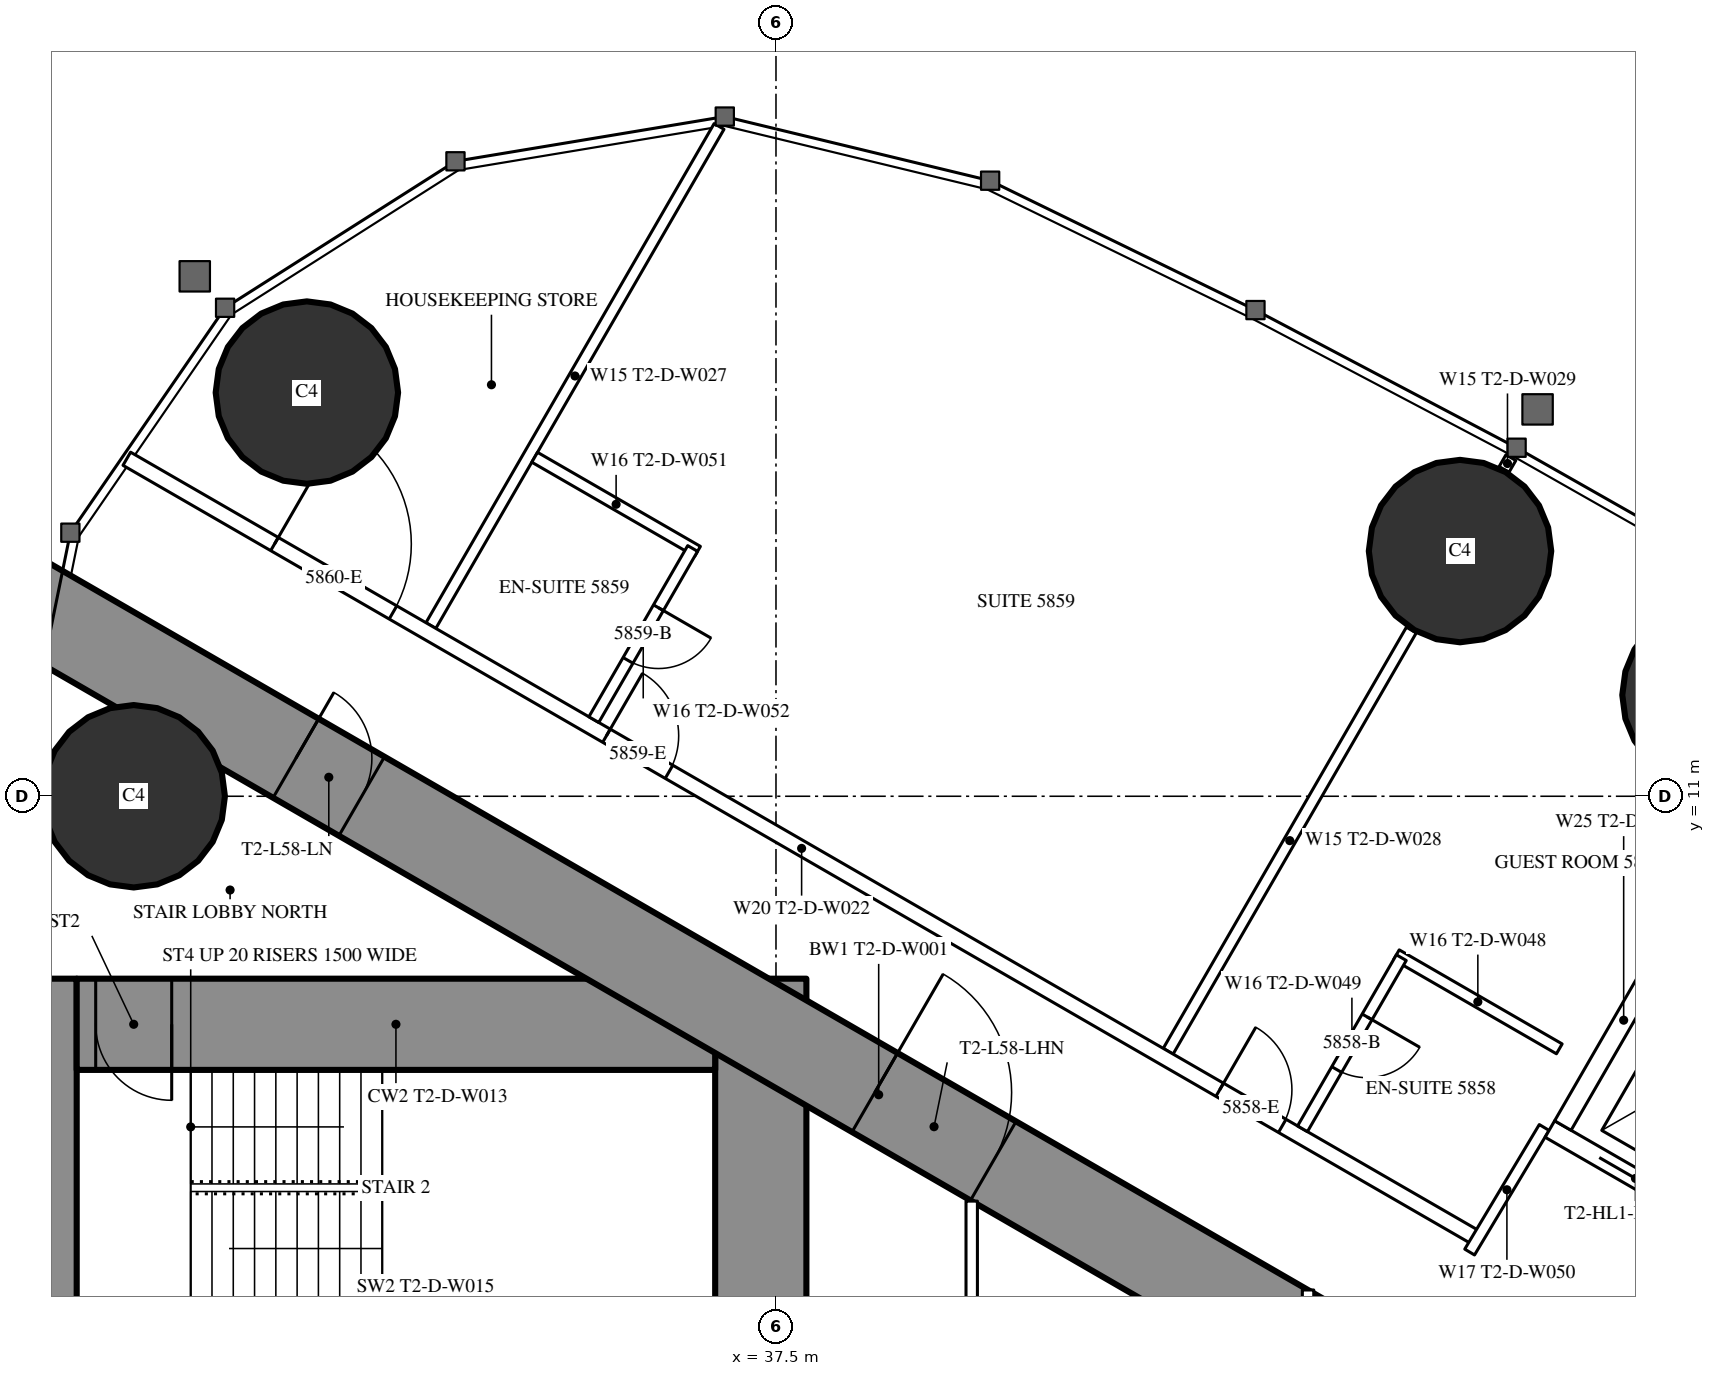
"""IFC4 building model, lengths in metres.
Left out: names, types, materials, properties, quantities, classifications, styles, units other than length and angle.
Written with IfcOpenShell. Run it as: python <this file> out.ifc"""

import sys

from ifc_helpers import new_model, si_unit, direction, frame, frame_2d, origin, origin_2d, place, context, subcontext, project, spatial, rectangle, circle, extrude, element, fill, save


model = new_model("IFC4")
c1 = context("Model", 3, precision=1e-05, world=origin(), true_north=direction((0.0, 1.0)))
c2 = subcontext(c1, "Body", "Model", "MODEL_VIEW")
j1 = project(units=[si_unit("LENGTHUNIT", "METRE"), si_unit("PLANEANGLEUNIT", "RADIAN")], contexts=[c1])
p1 = place(None, origin())
s1 = spatial("IfcSite", under=j1, at=p1, CompositionType="ELEMENT")
p2 = place(p1, origin())
s2 = spatial("IfcBuilding", under=s1, at=p2, CompositionType="ELEMENT")
p3 = place(p2, frame((0.0, 0.0, 218.9)))
s3 = spatial("IfcBuildingStorey", under=s2, at=p3, CompositionType="ELEMENT", Elevation=218.9)
for number, where, z_axis, x_axis in (
    (1, (31.328, 16.311, 0.0), (0.0, 0.0, 1.0), (1.0, 0.0, 0.0)),
    (2, (29.05, 11.0, 0.0), (0.0, 0.0, 1.0), (1.0, 0.0, 0.0)),
    (3, (49.834, 12.332, 0.0), (0.0, 0.0, 1.0), (1.0, 0.0, 0.0)),
    (4, (46.499, 14.226, 0.0), (0.0, 0.0, 1.0), (1.0, 0.0, 0.0)),
):
    element("IfcColumn", number, at=place(p3, frame(where, z_axis=z_axis, x_axis=x_axis)), inside=s3, PredefinedType="COLUMN", context=c2, shape_type="SweptSolid", body=[
        extrude(circle(Radius=1.2, at=origin_2d()), origin(), (0.0, 0.0, 1.0), 3.6),
    ])
p4 = place(p3, frame((27.9, -8.6, 0.0), z_axis=(0.0, 0.0, 1.0), x_axis=(0.0, 1.0, 0.0)))
e5 = element("IfcWall", 5, at=p4, inside=s3, PredefinedType="SHEAR", context=c2, shape_type="SweptSolid", body=[
    extrude(rectangle(XDim=17.2, YDim=0.8, at=frame_2d((8.6, 0.0))), origin(), (0.0, 0.0, 1.0), 3.6),
])
p5 = place(p4, frame((9.35, 0.0, 0.0)))
e6 = element("IfcOpeningElement", 6, at=p5, cuts=e5, PredefinedType="OPENING", context=c2, shape_type="SweptSolid", body=[
    extrude(rectangle(XDim=0.9, YDim=2.2, at=frame_2d((0.45, 1.1))), frame((0.0, 0.41, 0.0), z_axis=(0.0, -1.0, 0.0), x_axis=(1.0, 0.0, 0.0)), (0.0, 0.0, 1.0), 0.82),
])
p6 = place(p3, frame((37.3, -8.6, 0.0), z_axis=(0.0, 0.0, 1.0), x_axis=(0.0, 1.0, 0.0)))
e7 = element("IfcWall", 7, at=p6, inside=s3, PredefinedType="SHEAR", context=c2, shape_type="SweptSolid", body=[
    extrude(rectangle(XDim=17.2, YDim=1.2, at=frame_2d((8.6, 0.0))), origin(), (0.0, 0.0, 1.0), 3.6),
])
p7 = place(p6, frame((7.7, 0.0, 0.0)))
e8 = element("IfcOpeningElement", 8, at=p7, cuts=e7, PredefinedType="OPENING", context=c2, shape_type="SweptSolid", body=[
    extrude(rectangle(XDim=1.8, YDim=2.2, at=frame_2d((0.9, 1.1))), frame((0.0, 0.61, 0.0), z_axis=(0.0, -1.0, 0.0), x_axis=(1.0, 0.0, 0.0)), (0.0, 0.0, 1.0), 1.22),
])
p8 = place(p3, frame((28.3, 8.0, 0.0), z_axis=(0.0, 0.0, 1.0), x_axis=(1.0, 0.0, 0.0)))
e9 = element("IfcWall", 9, at=p8, inside=s3, PredefinedType="SHEAR", context=c2, shape_type="SweptSolid", body=[
    extrude(rectangle(XDim=8.4, YDim=1.2, at=frame_2d((4.2, 0.0))), origin(), (0.0, 0.0, 1.0), 3.6),
])
p9 = place(p8, frame((0.25, 0.0, 0.0)))
e10 = element("IfcOpeningElement", 10, at=p9, cuts=e9, PredefinedType="OPENING", context=c2, shape_type="SweptSolid", body=[
    extrude(rectangle(XDim=1.0, YDim=2.2, at=frame_2d((0.5, 1.1))), frame((0.0, 0.61, 0.0), z_axis=(0.0, -1.0, 0.0), x_axis=(1.0, 0.0, 0.0)), (0.0, 0.0, 1.0), 1.22),
])
p10 = place(p3, frame((27.2, 13.8, 0.0), z_axis=(0.0, 0.0, 1.0), x_axis=(0.866024515034, -0.500001539357, 0.0)))
e11 = element("IfcWall", 11, at=p10, inside=s3, PredefinedType="SHEAR", context=c2, shape_type="SweptSolid", body=[
    extrude(rectangle(XDim=26.907, YDim=1.2, at=frame_2d((13.454, 0.0))), origin(), (0.0, 0.0, 1.0), 3.6),
])
p11 = place(p10, frame((4.6, 0.0, 0.0)))
e12 = element("IfcOpeningElement", 12, at=p11, cuts=e11, PredefinedType="OPENING", context=c2, shape_type="SweptSolid", body=[
    extrude(rectangle(XDim=1.0, YDim=2.2, at=frame_2d((0.5, 1.1))), frame((0.0, 0.61, 0.0), z_axis=(0.0, -1.0, 0.0), x_axis=(1.0, 0.0, 0.0)), (0.0, 0.0, 1.0), 1.22),
])
p12 = place(p10, frame((13.395, 0.0, 0.0)))
e13 = element("IfcOpeningElement", 13, at=p12, cuts=e11, PredefinedType="OPENING", context=c2, shape_type="SweptSolid", body=[
    extrude(rectangle(XDim=1.8, YDim=2.2, at=frame_2d((0.9, 1.1))), frame((0.0, 0.61, 0.0), z_axis=(0.0, -1.0, 0.0), x_axis=(1.0, 0.0, 0.0)), (0.0, 0.0, 1.0), 1.22),
])
p13 = place(p3, frame((32.96, 13.246, 0.0), z_axis=(0.0, 0.0, 1.0), x_axis=(0.500000236886, 0.866025267018, 0.0)))
e14 = element("IfcWall", 14, at=p13, inside=s3, PredefinedType="PARTITIONING", context=c2, shape_type="SweptSolid", body=[
    extrude(rectangle(XDim=7.583, YDim=0.15, at=frame_2d((3.791, 0.0))), origin(), (0.0, 0.0, 1.0), 3.35),
])
p14 = place(p3, frame((42.66, 7.646, 0.0), z_axis=(0.0, 0.0, 1.0), x_axis=(0.499996592859, 0.866027370889, 0.0)))
e15 = element("IfcWall", 15, at=p14, inside=s3, PredefinedType="PARTITIONING", context=c2, shape_type="SweptSolid", body=[
    extrude(rectangle(XDim=6.398, YDim=0.15, at=frame_2d((3.199, 0.0))), origin(), (0.0, 0.0, 1.0), 2.45),
])
p15 = place(p3, frame((47.079, 15.3, 0.0), z_axis=(0.0, 0.0, 1.0), x_axis=(0.499212083968, 0.866479829667, 0.0)))
e16 = element("IfcWall", 16, at=p15, inside=s3, PredefinedType="PARTITIONING", context=c2, shape_type="SweptSolid", body=[
    extrude(rectangle(XDim=0.179, YDim=0.15, at=frame_2d((0.09, 0.0))), origin(), (0.0, 0.0, 1.0), 2.45),
])
p16 = place(p3, frame((28.959, 15.44, 0.0), z_axis=(0.0, 0.0, 1.0), x_axis=(0.866028936079, -0.499993881836, 0.0)))
e17 = element("IfcWall", 17, at=p16, inside=s3, PredefinedType="PARTITIONING", context=c2, shape_type="SweptSolid", body=[
    extrude(rectangle(XDim=20.503, YDim=0.2, at=frame_2d((10.251, 0.0))), origin(), (0.0, 0.0, 1.0), 3.35),
])
p17 = place(p16, frame((16.603, 0.0, 0.0)))
e18 = element("IfcOpeningElement", 18, at=p17, cuts=e17, PredefinedType="OPENING", context=c2, shape_type="SweptSolid", body=[
    extrude(rectangle(XDim=0.95, YDim=2.2, at=frame_2d((0.475, 1.1))), frame((0.0, 0.11, 0.0), z_axis=(0.0, -1.0, 0.0), x_axis=(1.0, 0.0, 0.0)), (0.0, 0.0, 1.0), 0.22),
])
p18 = place(p16, frame((7.287, 0.0, 0.0)))
e19 = element("IfcOpeningElement", 19, at=p18, cuts=e17, PredefinedType="OPENING", context=c2, shape_type="SweptSolid", body=[
    extrude(rectangle(XDim=0.95, YDim=2.2, at=frame_2d((0.475, 1.1))), frame((0.0, 0.11, 0.0), z_axis=(0.0, -1.0, 0.0), x_axis=(1.0, 0.0, 0.0)), (0.0, 0.0, 1.0), 0.22),
])
p19 = place(p16, frame((2.244, 0.0, 0.0)))
e20 = element("IfcOpeningElement", 20, at=p19, cuts=e17, PredefinedType="OPENING", context=c2, shape_type="SweptSolid", body=[
    extrude(rectangle(XDim=1.8, YDim=2.03, at=frame_2d((0.9, 1.015))), frame((0.0, 0.11, 0.0), z_axis=(0.0, -1.0, 0.0), x_axis=(1.0, 0.0, 0.0)), (0.0, 0.0, 1.0), 0.22),
])
p20 = place(p3, frame((47.606, 6.642, 0.0), z_axis=(0.0, 0.0, 1.0), x_axis=(-0.51353662755, -0.858067673418, 0.0)))
e21 = element("IfcWall", 21, at=p20, inside=s3, PredefinedType="PARTITIONING", context=c2, shape_type="SweptSolid", body=[
    extrude(rectangle(XDim=1.91, YDim=0.15, at=frame_2d((0.955, 0.0))), origin(), (0.0, 0.0, 1.0), 3.35),
])
p21 = place(p3, frame((45.662, 8.914, 0.0), z_axis=(0.0, 0.0, 1.0), x_axis=(0.86604923931, -0.499958713387, 0.0)))
e22 = element("IfcWall", 22, at=p21, inside=s3, PredefinedType="PARTITIONING", context=c2, shape_type="SweptSolid", body=[
    extrude(rectangle(XDim=2.475, YDim=0.15, at=frame_2d((1.237, 0.0))), origin(), (0.0, 0.0, 1.0), 3.35),
])
p22 = place(p3, frame((44.427, 6.625, 0.0), z_axis=(0.0, 0.0, 1.0), x_axis=(0.500006934395, 0.866021400173, 0.0)))
e23 = element("IfcWall", 23, at=p22, inside=s3, PredefinedType="PARTITIONING", context=c2, shape_type="SweptSolid", body=[
    extrude(rectangle(XDim=2.6, YDim=0.15, at=frame_2d((1.3, 0.0))), origin(), (0.0, 0.0, 1.0), 3.35),
])
p23 = place(p22, frame((0.9, 0.0, 0.0)))
e24 = element("IfcOpeningElement", 24, at=p23, cuts=e23, PredefinedType="OPENING", context=c2, shape_type="SweptSolid", body=[
    extrude(rectangle(XDim=0.8, YDim=2.2, at=frame_2d((0.4, 1.1))), frame((0.0, 0.085, 0.0), z_axis=(0.0, -1.0, 0.0), x_axis=(1.0, 0.0, 0.0)), (0.0, 0.0, 1.0), 0.17),
])
p24 = place(p3, frame((34.325, 15.46, 0.0), z_axis=(0.0, 0.0, 1.0), x_axis=(0.866031185235, -0.4999899861, 0.0)))
e25 = element("IfcWall", 25, at=p24, inside=s3, PredefinedType="PARTITIONING", context=c2, shape_type="SweptSolid", body=[
    extrude(rectangle(XDim=2.475, YDim=0.15, at=frame_2d((1.238, 0.0))), origin(), (0.0, 0.0, 1.0), 3.35),
])
p25 = place(p3, frame((35.104, 12.008, 0.0), z_axis=(0.0, 0.0, 1.0), x_axis=(0.500047596559, 0.865997922154, 0.0)))
e26 = element("IfcWall", 26, at=p25, inside=s3, PredefinedType="PARTITIONING", context=c2, shape_type="SweptSolid", body=[
    extrude(rectangle(XDim=2.6, YDim=0.15, at=frame_2d((1.3, 0.0))), origin(), (0.0, 0.0, 1.0), 3.35),
])
p26 = place(p25, frame((0.9, 0.0, 0.0)))
e27 = element("IfcOpeningElement", 27, at=p26, cuts=e26, PredefinedType="OPENING", context=c2, shape_type="SweptSolid", body=[
    extrude(rectangle(XDim=0.8, YDim=2.2, at=frame_2d((0.4, 1.1))), frame((0.0, 0.085, 0.0), z_axis=(0.0, -1.0, 0.0), x_axis=(1.0, 0.0, 0.0)), (0.0, 0.0, 1.0), 0.17),
])
p27 = place(p3, frame((40.075, -5.674, 0.0), z_axis=(0.0, 0.0, 1.0), x_axis=(0.0, 1.0, 0.0)))
e28 = element("IfcWall", 28, at=p27, inside=s3, PredefinedType="PARTITIONING", context=c2, shape_type="SweptSolid", body=[
    extrude(rectangle(XDim=11.348, YDim=0.15, at=frame_2d((5.674, 0.0))), origin(), (0.0, 0.0, 1.0), 3.35),
])
p28 = place(p27, frame((4.774, 0.0, 0.0)))
e29 = element("IfcOpeningElement", 29, at=p28, cuts=e28, PredefinedType="OPENING", context=c2, shape_type="SweptSolid", body=[
    extrude(rectangle(XDim=1.8, YDim=2.2, at=frame_2d((0.9, 1.1))), frame((0.0, 0.085, 0.0), z_axis=(0.0, -1.0, 0.0), x_axis=(1.0, 0.0, 0.0)), (0.0, 0.0, 1.0), 0.17),
])
p29 = place(p3, frame((44.5, -4.505, 0.0), z_axis=(0.0, 0.0, 1.0), x_axis=(0.0, 1.0, 0.0)))
e30 = element("IfcWall", 30, at=p29, inside=s3, PredefinedType="PARTITIONING", context=c2, shape_type="SweptSolid", body=[
    extrude(rectangle(XDim=9.009, YDim=0.15, at=frame_2d((4.505, 0.0))), origin(), (0.0, 0.0, 1.0), 3.35),
])
p30 = place(p29, frame((1.752, 0.0, 0.0)))
e31 = element("IfcOpeningElement", 31, at=p30, cuts=e30, PredefinedType="OPENING", context=c2, shape_type="SweptSolid", body=[
    extrude(rectangle(XDim=1.0, YDim=2.2, at=frame_2d((0.5, 1.1))), frame((0.0, 0.085, 0.0), z_axis=(0.0, -1.0, 0.0), x_axis=(1.0, 0.0, 0.0)), (0.0, 0.0, 1.0), 0.17),
])
p31 = place(p29, frame((6.257, 0.0, 0.0)))
e32 = element("IfcOpeningElement", 32, at=p31, cuts=e30, PredefinedType="OPENING", context=c2, shape_type="SweptSolid", body=[
    extrude(rectangle(XDim=1.0, YDim=2.2, at=frame_2d((0.5, 1.1))), frame((0.0, 0.085, 0.0), z_axis=(0.0, -1.0, 0.0), x_axis=(1.0, 0.0, 0.0)), (0.0, 0.0, 1.0), 0.17),
])
p32 = place(p3, frame((47.681, 6.622, 0.0), z_axis=(0.0, 0.0, 1.0), x_axis=(0.86603344179, -0.499986077507, 0.0)))
e33 = element("IfcWall", 33, at=p32, inside=s3, PredefinedType="PARTITIONING", context=c2, shape_type="SweptSolid", body=[
    extrude(rectangle(XDim=6.6, YDim=0.25, at=frame_2d((3.3, 0.0))), origin(), (0.0, 0.0, 1.0), 3.35),
])
p33 = place(p32, frame((0.75, 0.0, 0.0)))
e34 = element("IfcOpeningElement", 34, at=p33, cuts=e33, PredefinedType="OPENING", context=c2, shape_type="SweptSolid", body=[
    extrude(rectangle(XDim=1.1, YDim=2.2, at=frame_2d((0.55, 1.1))), frame((0.0, 0.135, 0.0), z_axis=(0.0, -1.0, 0.0), x_axis=(1.0, 0.0, 0.0)), (0.0, 0.0, 1.0), 0.27),
])
p34 = place(p32, frame((2.75, 0.0, 0.0)))
e35 = element("IfcOpeningElement", 35, at=p34, cuts=e33, PredefinedType="OPENING", context=c2, shape_type="SweptSolid", body=[
    extrude(rectangle(XDim=1.1, YDim=2.2, at=frame_2d((0.55, 1.1))), frame((0.0, 0.135, 0.0), z_axis=(0.0, -1.0, 0.0), x_axis=(1.0, 0.0, 0.0)), (0.0, 0.0, 1.0), 0.27),
])
p35 = place(p32, frame((4.75, 0.0, 0.0)))
e36 = element("IfcOpeningElement", 36, at=p35, cuts=e33, PredefinedType="OPENING", context=c2, shape_type="SweptSolid", body=[
    extrude(rectangle(XDim=1.1, YDim=2.2, at=frame_2d((0.55, 1.1))), frame((0.0, 0.135, 0.0), z_axis=(0.0, -1.0, 0.0), x_axis=(1.0, 0.0, 0.0)), (0.0, 0.0, 1.0), 0.27),
])
p36 = place(p3, frame((47.852, 6.668, 0.0), z_axis=(0.0, 0.0, 1.0), x_axis=(0.499929347863, 0.866066190972, 0.0)))
e37 = element("IfcWall", 37, at=p36, inside=s3, PredefinedType="PARTITIONING", context=c2, shape_type="SweptSolid", body=[
    extrude(rectangle(XDim=3.201, YDim=0.25, at=frame_2d((1.6, 0.0))), origin(), (0.0, 0.0, 1.0), 3.35),
])
p37 = place(p23, origin())
e38 = element("IfcDoor", 38, at=p37, inside=s3, OperationType="SINGLE_SWING_RIGHT", PredefinedType="DOOR", context=c2, shape_type="SweptSolid", body=[
    extrude(rectangle(XDim=0.8, YDim=2.2, at=frame_2d((0.4, 1.1))), frame((0.0, 0.025, 0.0), z_axis=(0.0, -1.0, 0.0), x_axis=(1.0, 0.0, 0.0)), (0.0, 0.0, 1.0), 0.05),
])
fill(e24, e38)
p38 = place(p17, origin())
e39 = element("IfcDoor", 39, at=p38, inside=s3, OperationType="SINGLE_SWING_LEFT", PredefinedType="DOOR", context=c2, shape_type="SweptSolid", body=[
    extrude(rectangle(XDim=0.95, YDim=2.2, at=frame_2d((0.475, 1.1))), frame((0.0, 0.025, 0.0), z_axis=(0.0, -1.0, 0.0), x_axis=(1.0, 0.0, 0.0)), (0.0, 0.0, 1.0), 0.05),
])
fill(e18, e39)
p39 = place(p26, origin())
e40 = element("IfcDoor", 40, at=p39, inside=s3, OperationType="SINGLE_SWING_RIGHT", PredefinedType="DOOR", context=c2, shape_type="SweptSolid", body=[
    extrude(rectangle(XDim=0.8, YDim=2.2, at=frame_2d((0.4, 1.1))), frame((0.0, 0.025, 0.0), z_axis=(0.0, -1.0, 0.0), x_axis=(1.0, 0.0, 0.0)), (0.0, 0.0, 1.0), 0.05),
])
fill(e27, e40)
p40 = place(p18, origin())
e41 = element("IfcDoor", 41, at=p40, inside=s3, OperationType="SINGLE_SWING_LEFT", PredefinedType="DOOR", context=c2, shape_type="SweptSolid", body=[
    extrude(rectangle(XDim=0.95, YDim=2.2, at=frame_2d((0.475, 1.1))), frame((0.0, 0.025, 0.0), z_axis=(0.0, -1.0, 0.0), x_axis=(1.0, 0.0, 0.0)), (0.0, 0.0, 1.0), 0.05),
])
fill(e19, e41)
p41 = place(p19, origin())
e42 = element("IfcDoor", 42, at=p41, inside=s3, OperationType="DOUBLE_DOOR_SINGLE_SWING", PredefinedType="DOOR", context=c2, shape_type="SweptSolid", body=[
    extrude(rectangle(XDim=1.8, YDim=2.03, at=frame_2d((0.9, 1.015))), frame((0.0, 0.025, 0.0), z_axis=(0.0, -1.0, 0.0), x_axis=(1.0, 0.0, 0.0)), (0.0, 0.0, 1.0), 0.05),
])
fill(e20, e42)
p42 = place(p11, origin())
e43 = element("IfcDoor", 43, at=p42, inside=s3, OperationType="SINGLE_SWING_LEFT", PredefinedType="DOOR", context=c2, shape_type="SweptSolid", body=[
    extrude(rectangle(XDim=1.0, YDim=2.2, at=frame_2d((0.5, 1.1))), frame((0.0, 0.025, 0.0), z_axis=(0.0, -1.0, 0.0), x_axis=(1.0, 0.0, 0.0)), (0.0, 0.0, 1.0), 0.05),
])
fill(e12, e43)
p43 = place(p12, origin())
e44 = element("IfcDoor", 44, at=p43, inside=s3, OperationType="DOUBLE_DOOR_SINGLE_SWING", PredefinedType="DOOR", context=c2, shape_type="SweptSolid", body=[
    extrude(rectangle(XDim=1.8, YDim=2.2, at=frame_2d((0.9, 1.1))), frame((0.0, 0.025, 0.0), z_axis=(0.0, -1.0, 0.0), x_axis=(1.0, 0.0, 0.0)), (0.0, 0.0, 1.0), 0.05),
])
fill(e13, e44)
p44 = place(p9, origin())
e45 = element("IfcDoor", 45, at=p44, inside=s3, OperationType="SINGLE_SWING_RIGHT", PredefinedType="DOOR", context=c2, shape_type="SweptSolid", body=[
    extrude(rectangle(XDim=1.0, YDim=2.2, at=frame_2d((0.5, 1.1))), frame((0.0, 0.025, 0.0), z_axis=(0.0, -1.0, 0.0), x_axis=(1.0, 0.0, 0.0)), (0.0, 0.0, 1.0), 0.05),
])
fill(e10, e45)
p45 = place(p33, origin())
e46 = element("IfcDoor", 46, at=p45, inside=s3, OperationType="DOUBLE_DOOR_SLIDING", PredefinedType="USERDEFINED", context=c2, shape_type="SweptSolid", body=[
    extrude(rectangle(XDim=1.1, YDim=2.2, at=frame_2d((0.55, 1.1))), frame((0.0, 0.025, 0.0), z_axis=(0.0, -1.0, 0.0), x_axis=(1.0, 0.0, 0.0)), (0.0, 0.0, 1.0), 0.05),
])
fill(e34, e46)
save(model, sys.argv[1])
